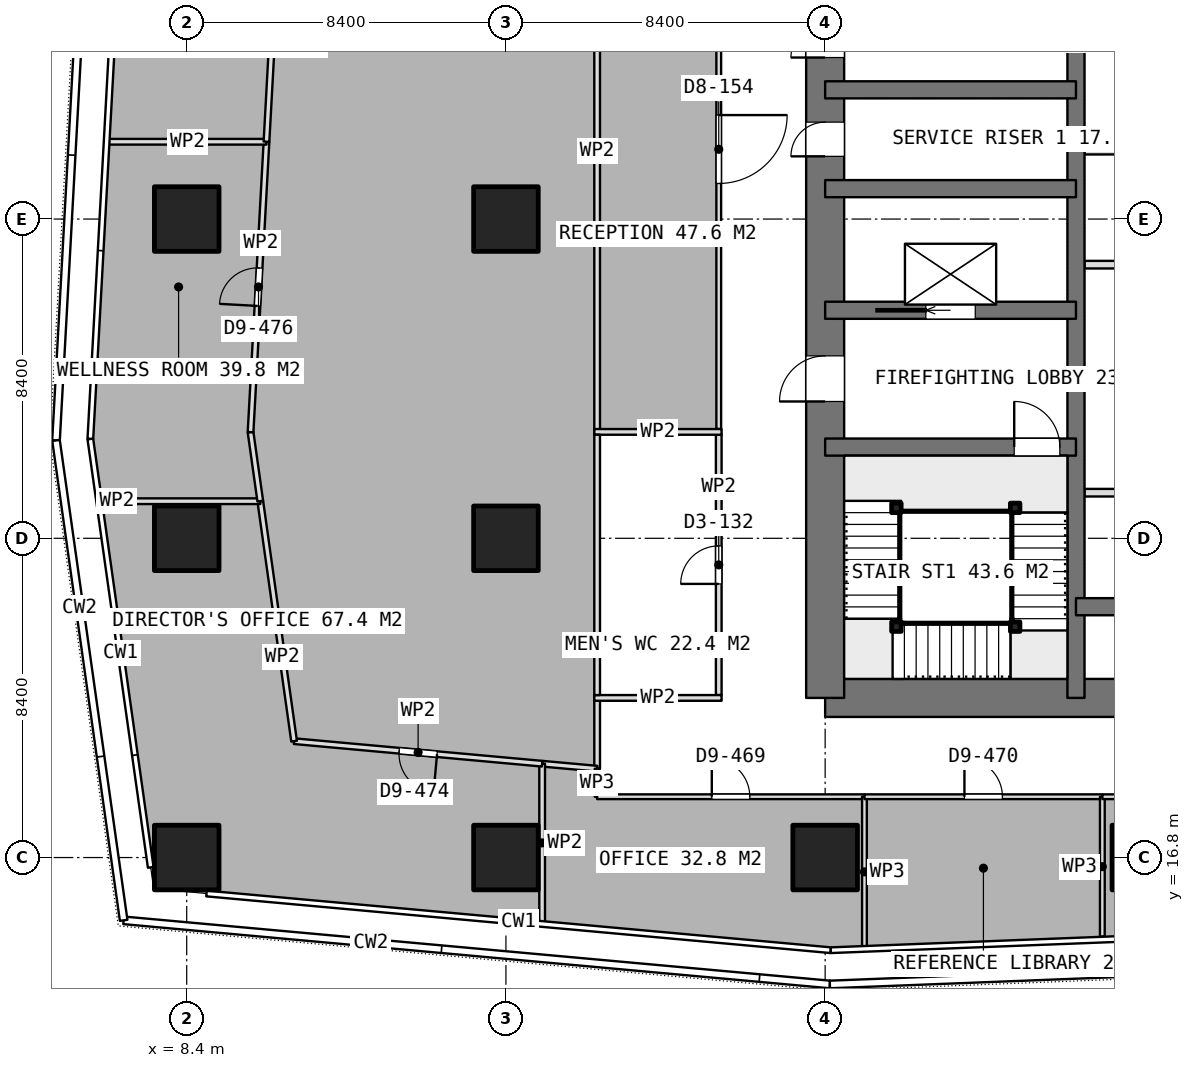
"""IFC4 building model, lengths in metres.
Left out: names, types, materials, properties, quantities, classifications, styles, units other than length and angle.
Written with IfcOpenShell. Run it as: python <this file> out.ifc"""

import sys

from ifc_helpers import new_model, si_unit, direction, frame, frame_2d, origin, origin_2d, place, context, subcontext, project, spatial, rectangle, extrude, element, fill, save


model = new_model("IFC4")
c1 = context("Model", 3, precision=1e-05, world=origin(), true_north=direction((0.0, 1.0)))
c2 = subcontext(c1, "Body", "Model", "MODEL_VIEW")
j1 = project(units=[si_unit("LENGTHUNIT", "METRE"), si_unit("PLANEANGLEUNIT", "RADIAN")], contexts=[c1])
p1 = place(None, origin())
s1 = spatial("IfcSite", under=j1, at=p1, CompositionType="ELEMENT")
p2 = place(p1, origin())
s2 = spatial("IfcBuilding", under=s1, at=p2, CompositionType="ELEMENT")
p3 = place(p2, frame((0.0, 0.0, 125.3)))
s3 = spatial("IfcBuildingStorey", under=s2, at=p3, CompositionType="ELEMENT", Elevation=125.3)
p4 = place(p3, frame((25.2, 21.0, 0.0), z_axis=(0.0, 0.0, 1.0), x_axis=(1.0, 0.0, 0.0)))
e1 = element("IfcWall", 1, at=p4, inside=s3, PredefinedType="SHEAR", context=c2, shape_type="SweptSolid", body=[
    extrude(rectangle(XDim=10.4, YDim=1.0, at=frame_2d((5.2, 0.0))), origin(), (0.0, 0.0, 1.0), 3.75),
])
p5 = place(p3, frame((25.2, 21.0, 0.0), z_axis=(0.0, 0.0, 1.0), x_axis=(0.0, 1.0, 0.0)))
e2 = element("IfcWall", 2, at=p5, inside=s3, PredefinedType="SHEAR", context=c2, shape_type="SweptSolid", body=[
    extrude(rectangle(XDim=25.2, YDim=1.0, at=frame_2d((12.6, 0.0))), origin(), (0.0, 0.0, 1.0), 3.75),
])
p6 = place(p5, frame((7.8, 0.0, 0.0)))
e3 = element("IfcOpeningElement", 3, at=p6, cuts=e2, PredefinedType="OPENING", context=c2, shape_type="SweptSolid", body=[
    extrude(rectangle(XDim=1.2, YDim=2.1, at=frame_2d((0.6, 1.05))), frame((0.0, 0.51, 0.0), z_axis=(0.0, -1.0, 0.0), x_axis=(1.0, 0.0, 0.0)), (0.0, 0.0, 1.0), 1.02),
])
p7 = place(p5, frame((14.25, 0.0, 0.0)))
e4 = element("IfcOpeningElement", 4, at=p7, cuts=e2, PredefinedType="OPENING", context=c2, shape_type="SweptSolid", body=[
    extrude(rectangle(XDim=0.9, YDim=2.1, at=frame_2d((0.45, 1.05))), frame((0.0, 0.51, 0.0), z_axis=(0.0, -1.0, 0.0), x_axis=(1.0, 0.0, 0.0)), (0.0, 0.0, 1.0), 1.02),
])
p8 = place(p5, frame((16.85, 0.0, 0.0)))
e5 = element("IfcOpeningElement", 5, at=p8, cuts=e2, PredefinedType="OPENING", context=c2, shape_type="SweptSolid", body=[
    extrude(rectangle(XDim=0.9, YDim=2.1, at=frame_2d((0.45, 1.05))), frame((0.0, 0.51, 0.0), z_axis=(0.0, -1.0, 0.0), x_axis=(1.0, 0.0, 0.0)), (0.0, 0.0, 1.0), 1.02),
])
p9 = place(p5, frame((19.025, 0.0, 0.0)))
e6 = element("IfcOpeningElement", 6, at=p9, cuts=e2, PredefinedType="OPENING", context=c2, shape_type="SweptSolid", body=[
    extrude(rectangle(XDim=1.2, YDim=2.1, at=frame_2d((0.6, 1.05))), frame((0.0, 0.51, 0.0), z_axis=(0.0, -1.0, 0.0), x_axis=(1.0, 0.0, 0.0)), (0.0, 0.0, 1.0), 1.02),
])
p10 = place(p3, frame((31.8, 21.0, 0.0), z_axis=(0.0, 0.0, 1.0), x_axis=(0.0, 1.0, 0.0)))
e7 = element("IfcWall", 7, at=p10, inside=s3, PredefinedType="SHEAR", context=c2, shape_type="SweptSolid", body=[
    extrude(rectangle(XDim=25.2, YDim=0.45, at=frame_2d((12.6, 0.0))), origin(), (0.0, 0.0, 1.0), 3.75),
])
p11 = place(p3, frame((31.8, 23.4, 0.0), z_axis=(0.0, 0.0, 1.0), x_axis=(1.0, 0.0, 0.0)))
e8 = element("IfcWall", 8, at=p11, inside=s3, PredefinedType="SHEAR", context=c2, shape_type="SweptSolid", body=[
    extrude(rectangle(XDim=3.8, YDim=0.45, at=frame_2d((1.9, 0.0))), origin(), (0.0, 0.0, 1.0), 3.75),
])
p12 = place(p3, frame((25.2, 27.6, 0.0), z_axis=(0.0, 0.0, 1.0), x_axis=(1.0, 0.0, 0.0)))
e9 = element("IfcWall", 9, at=p12, inside=s3, PredefinedType="SHEAR", context=c2, shape_type="SweptSolid", body=[
    extrude(rectangle(XDim=6.6, YDim=0.45, at=frame_2d((3.3, 0.0))), origin(), (0.0, 0.0, 1.0), 3.75),
])
p13 = place(p12, frame((4.975, 0.0, 0.0)))
e10 = element("IfcOpeningElement", 10, at=p13, cuts=e9, PredefinedType="OPENING", context=c2, shape_type="SweptSolid", body=[
    extrude(rectangle(XDim=1.2, YDim=2.1, at=frame_2d((0.6, 1.05))), frame((0.0, 0.235, 0.0), z_axis=(0.0, -1.0, 0.0), x_axis=(1.0, 0.0, 0.0)), (0.0, 0.0, 1.0), 0.47),
])
p14 = place(p3, frame((25.2, 31.2, 0.0), z_axis=(0.0, 0.0, 1.0), x_axis=(1.0, 0.0, 0.0)))
e11 = element("IfcWall", 11, at=p14, inside=s3, PredefinedType="SHEAR", context=c2, shape_type="SweptSolid", body=[
    extrude(rectangle(XDim=6.6, YDim=0.45, at=frame_2d((3.3, 0.0))), origin(), (0.0, 0.0, 1.0), 3.75),
])
p15 = place(p14, frame((2.65, 0.0, 0.0)))
e12 = element("IfcOpeningElement", 12, at=p15, cuts=e11, PredefinedType="OPENING", context=c2, shape_type="SweptSolid", body=[
    extrude(rectangle(XDim=1.3, YDim=2.1, at=frame_2d((0.65, 1.05))), frame((0.0, 0.235, 0.0), z_axis=(0.0, -1.0, 0.0), x_axis=(1.0, 0.0, 0.0)), (0.0, 0.0, 1.0), 0.47),
])
for number, where, z_axis, x_axis in (
    (13, (25.2, 34.4, 0.0), (0.0, 0.0, 1.0), (1.0, 0.0, 0.0)),
    (14, (25.2, 37.0, 0.0), (0.0, 0.0, 1.0), (1.0, 0.0, 0.0)),
):
    element("IfcWall", number, at=place(p3, frame(where, z_axis=z_axis, x_axis=x_axis)), inside=s3, PredefinedType="SHEAR", context=c2, shape_type="SweptSolid", body=[
        extrude(rectangle(XDim=6.6, YDim=0.45, at=frame_2d((3.3, 0.0))), origin(), (0.0, 0.0, 1.0), 3.75),
    ])
for number, where, z_axis, x_axis in (
    (15, (8.4, 16.8, 0.0), (0.0, 0.0, 1.0), (1.0, 0.0, 0.0)),
    (16, (8.4, 25.2, 0.0), (0.0, 0.0, 1.0), (1.0, 0.0, 0.0)),
    (17, (8.4, 33.6, 0.0), (0.0, 0.0, 1.0), (1.0, 0.0, 0.0)),
    (18, (16.8, 16.8, 0.0), (0.0, 0.0, 1.0), (1.0, 0.0, 0.0)),
    (19, (16.8, 25.2, 0.0), (0.0, 0.0, 1.0), (1.0, 0.0, 0.0)),
    (20, (16.8, 33.6, 0.0), (0.0, 0.0, 1.0), (1.0, 0.0, 0.0)),
    (21, (25.2, 16.8, 0.0), (0.0, 0.0, 1.0), (1.0, 0.0, 0.0)),
    (22, (33.6, 16.8, 0.0), (0.0, 0.0, 1.0), (1.0, 0.0, 0.0)),
):
    element("IfcColumn", number, at=place(p3, frame(where, z_axis=z_axis, x_axis=x_axis)), inside=s3, PredefinedType="COLUMN", context=c2, shape_type="SweptSolid", body=[
        extrude(rectangle(XDim=1.7, YDim=1.7, at=origin_2d()), origin(), (0.0, 0.0, 1.0), 3.75),
    ])
for number, where, z_axis, x_axis in (
    (23, (32.025, 26.4, 0.0), (0.0, 0.0, 1.0), (1.0, 0.0, 0.0)),
    (24, (32.025, 29.4, 0.0), (0.0, 0.0, 1.0), (1.0, 0.0, 0.0)),
    (25, (32.025, 32.4, 0.0), (0.0, 0.0, 1.0), (1.0, 0.0, 0.0)),
    (26, (32.025, 35.4, 0.0), (0.0, 0.0, 1.0), (1.0, 0.0, 0.0)),
):
    element("IfcWall", number, at=place(p3, frame(where, z_axis=z_axis, x_axis=x_axis)), inside=s3, PredefinedType="PARTITIONING", context=c2, shape_type="SweptSolid", body=[
        extrude(rectangle(XDim=3.35, YDim=0.2, at=frame_2d((1.675, 0.0))), origin(), (0.0, 0.0, 1.0), 3.5),
    ])
for number, where, z_axis, x_axis in (
    (27, (19.125, 21.0, 0.0), (0.0, 0.0, 1.0), (1.0, 0.0, 0.0)),
    (28, (19.125, 28.0, 0.0), (0.0, 0.0, 1.0), (1.0, 0.0, 0.0)),
):
    element("IfcWall", number, at=place(p3, frame(where, z_axis=z_axis, x_axis=x_axis)), inside=s3, PredefinedType="PARTITIONING", context=c2, shape_type="SweptSolid", body=[
        extrude(rectangle(XDim=3.35, YDim=0.15, at=frame_2d((1.675, 0.0))), origin(), (0.0, 0.0, 1.0), 3.5),
    ])
p16 = place(p3, frame((19.2, 21.075, 0.0), z_axis=(0.0, 0.0, 1.0), x_axis=(0.0, 1.0, 0.0)))
e29 = element("IfcWall", 29, at=p16, inside=s3, PredefinedType="PARTITIONING", context=c2, shape_type="SweptSolid", body=[
    extrude(rectangle(XDim=6.85, YDim=0.15, at=frame_2d((3.425, 0.0))), origin(), (0.0, 0.0, 1.0), 3.5),
])
p17 = place(p3, frame((22.4, 21.075, 0.0), z_axis=(0.0, 0.0, 1.0), x_axis=(0.0, 1.0, 0.0)))
e30 = element("IfcWall", 30, at=p17, inside=s3, PredefinedType="PARTITIONING", context=c2, shape_type="SweptSolid", body=[
    extrude(rectangle(XDim=6.85, YDim=0.15, at=frame_2d((3.425, 0.0))), origin(), (0.0, 0.0, 1.0), 3.5),
])
p18 = place(p17, frame((2.925, 0.0, 0.0)))
e31 = element("IfcOpeningElement", 31, at=p18, cuts=e30, PredefinedType="OPENING", context=c2, shape_type="SweptSolid", body=[
    extrude(rectangle(XDim=1.0, YDim=2.1, at=frame_2d((0.5, 1.05))), frame((0.0, 0.085, 0.0), z_axis=(0.0, -1.0, 0.0), x_axis=(1.0, 0.0, 0.0)), (0.0, 0.0, 1.0), 0.17),
])
p19 = place(p3, frame((19.2, 42.873, 0.0), z_axis=(0.0, 0.0, 1.0), x_axis=(0.0, -1.0, 0.0)))
e32 = element("IfcWall", 32, at=p19, inside=s3, PredefinedType="PARTITIONING", context=c2, shape_type="SweptSolid", body=[
    extrude(rectangle(XDim=14.948, YDim=0.15, at=frame_2d((7.474, 0.0))), origin(), (0.0, 0.0, 1.0), 3.5),
])
p20 = place(p3, frame((19.2, 21.075, 0.0), z_axis=(0.0, 0.0, 1.0), x_axis=(0.0, -1.0, 0.0)))
e33 = element("IfcWall", 33, at=p20, inside=s3, PredefinedType="PARTITIONING", context=c2, shape_type="SweptSolid", body=[
    extrude(rectangle(XDim=1.937, YDim=0.15, at=frame_2d((0.969, 0.0))), origin(), (0.0, 0.0, 1.0), 3.5),
])
p21 = place(p3, frame((19.2, 19.138, 0.0), z_axis=(0.0, 0.0, 1.0), x_axis=(-0.995920706464, 0.090232734836, 0.0)))
e34 = element("IfcWall", 34, at=p21, inside=s3, PredefinedType="PARTITIONING", context=c2, shape_type="SweptSolid", body=[
    extrude(rectangle(XDim=1.453, YDim=0.15, at=frame_2d((0.727, 0.0))), origin(), (0.0, 0.0, 1.0), 3.5),
])
p22 = place(p3, frame((17.753, 19.269, 0.0), z_axis=(0.0, 0.0, 1.0), x_axis=(0.0, -1.0, 0.0)))
e35 = element("IfcWall", 35, at=p22, inside=s3, PredefinedType="PARTITIONING", context=c2, shape_type="SweptSolid", body=[
    extrude(rectangle(XDim=4.167, YDim=0.15, at=frame_2d((2.083, 0.0))), origin(), (0.0, 0.0, 1.0), 3.5),
])
p23 = place(p3, frame((17.752, 19.269, 0.0), z_axis=(0.0, 0.0, 1.0), x_axis=(-0.995896565077, 0.090498793736, 0.0)))
e36 = element("IfcWall", 36, at=p23, inside=s3, PredefinedType="PARTITIONING", context=c2, shape_type="SweptSolid", body=[
    extrude(rectangle(XDim=6.553, YDim=0.15, at=frame_2d((3.276, 0.0))), origin(), (0.0, 0.0, 1.0), 3.5),
])
p24 = place(p23, frame((2.776, 0.0, 0.0)))
e37 = element("IfcOpeningElement", 37, at=p24, cuts=e36, PredefinedType="OPENING", context=c2, shape_type="SweptSolid", body=[
    extrude(rectangle(XDim=1.0, YDim=2.1, at=frame_2d((0.5, 1.05))), frame((0.0, 0.085, 0.0), z_axis=(0.0, -1.0, 0.0), x_axis=(1.0, 0.0, 0.0)), (0.0, 0.0, 1.0), 0.17),
])
p25 = place(p3, frame((11.226, 19.862, 0.0), z_axis=(0.0, 0.0, 1.0), x_axis=(-0.13959860056, 0.990208175447, 0.0)))
e38 = element("IfcWall", 38, at=p25, inside=s3, PredefinedType="PARTITIONING", context=c2, shape_type="SweptSolid", body=[
    extrude(rectangle(XDim=6.376, YDim=0.15, at=frame_2d((3.188, 0.0))), origin(), (0.0, 0.0, 1.0), 3.5),
])
p26 = place(p3, frame((10.336, 26.176, 0.0), z_axis=(0.0, 0.0, 1.0), x_axis=(-1.0, 0.0, 0.0)))
e39 = element("IfcWall", 39, at=p26, inside=s3, PredefinedType="PARTITIONING", context=c2, shape_type="SweptSolid", body=[
    extrude(rectangle(XDim=4.191, YDim=0.15, at=frame_2d((2.095, 0.0))), origin(), (0.0, 0.0, 1.0), 3.5),
])
p27 = place(p3, frame((10.336, 26.177, 0.0), z_axis=(0.0, 0.0, 1.0), x_axis=(-0.139520002301, 0.990219252973, 0.0)))
e40 = element("IfcWall", 40, at=p27, inside=s3, PredefinedType="PARTITIONING", context=c2, shape_type="SweptSolid", body=[
    extrude(rectangle(XDim=1.834, YDim=0.15, at=frame_2d((0.917, 0.0))), origin(), (0.0, 0.0, 1.0), 3.5),
])
p28 = place(p3, frame((10.08, 27.993, 0.0), z_axis=(0.0, 0.0, 1.0), x_axis=(0.054745561338, 0.998500337263, 0.0)))
e41 = element("IfcWall", 41, at=p28, inside=s3, PredefinedType="PARTITIONING", context=c2, shape_type="SweptSolid", body=[
    extrude(rectangle(XDim=7.653, YDim=0.15, at=frame_2d((3.826, 0.0))), origin(), (0.0, 0.0, 1.0), 3.5),
])
p29 = place(p28, frame((3.326, 0.0, 0.0)))
e42 = element("IfcOpeningElement", 42, at=p29, cuts=e41, PredefinedType="OPENING", context=c2, shape_type="SweptSolid", body=[
    extrude(rectangle(XDim=1.0, YDim=2.1, at=frame_2d((0.5, 1.05))), frame((0.0, 0.085, 0.0), z_axis=(0.0, -1.0, 0.0), x_axis=(1.0, 0.0, 0.0)), (0.0, 0.0, 1.0), 0.17),
])
p30 = place(p3, frame((10.499, 35.634, 0.0), z_axis=(0.0, 0.0, 1.0), x_axis=(-1.0, 0.0, 0.0)))
e43 = element("IfcWall", 43, at=p30, inside=s3, PredefinedType="PARTITIONING", context=c2, shape_type="SweptSolid", body=[
    extrude(rectangle(XDim=4.156, YDim=0.15, at=frame_2d((2.078, 0.0))), origin(), (0.0, 0.0, 1.0), 3.5),
])
p31 = place(p3, frame((10.499, 35.635, 0.0), z_axis=(0.0, 0.0, 1.0), x_axis=(0.054773615864, 0.9984987987, 0.0)))
e44 = element("IfcWall", 44, at=p31, inside=s3, PredefinedType="PARTITIONING", context=c2, shape_type="SweptSolid", body=[
    extrude(rectangle(XDim=7.359, YDim=0.15, at=frame_2d((3.679, 0.0))), origin(), (0.0, 0.0, 1.0), 3.5),
])
p32 = place(p31, frame((3.124, 0.0, 0.0)))
e45 = element("IfcOpeningElement", 45, at=p32, cuts=e44, PredefinedType="OPENING", context=c2, shape_type="SweptSolid", body=[
    extrude(rectangle(XDim=1.0, YDim=2.1, at=frame_2d((0.5, 1.05))), frame((0.0, 0.085, 0.0), z_axis=(0.0, -1.0, 0.0), x_axis=(1.0, 0.0, 0.0)), (0.0, 0.0, 1.0), 0.17),
])
p33 = place(p3, frame((19.2, 19.138, 0.0), z_axis=(0.0, 0.0, 1.0), x_axis=(0.0, -1.0, 0.0)))
e46 = element("IfcWall", 46, at=p33, inside=s3, PredefinedType="PARTITIONING", context=c2, shape_type="SweptSolid", body=[
    extrude(rectangle(XDim=0.738, YDim=0.125, at=frame_2d((0.369, 0.0))), origin(), (0.0, 0.0, 1.0), 3.5),
])
p34 = place(p3, frame((19.2, 18.4, 0.0), z_axis=(0.0, 0.0, 1.0), x_axis=(1.0, 0.0, 0.0)))
e47 = element("IfcWall", 47, at=p34, inside=s3, PredefinedType="PARTITIONING", context=c2, shape_type="SweptSolid", body=[
    extrude(rectangle(XDim=7.034, YDim=0.125, at=frame_2d((3.517, 0.0))), origin(), (0.0, 0.0, 1.0), 3.5),
])
p35 = place(p34, frame((3.017, 0.0, 0.0)))
e48 = element("IfcOpeningElement", 48, at=p35, cuts=e47, PredefinedType="OPENING", context=c2, shape_type="SweptSolid", body=[
    extrude(rectangle(XDim=1.0, YDim=2.1, at=frame_2d((0.5, 1.05))), frame((0.0, 0.073, 0.0), z_axis=(0.0, -1.0, 0.0), x_axis=(1.0, 0.0, 0.0)), (0.0, 0.0, 1.0), 0.145),
])
p36 = place(p3, frame((26.234, 18.4, 0.0), z_axis=(0.0, 0.0, 1.0), x_axis=(0.0, -1.0, 0.0)))
e49 = element("IfcWall", 49, at=p36, inside=s3, PredefinedType="PARTITIONING", context=c2, shape_type="SweptSolid", body=[
    extrude(rectangle(XDim=3.954, YDim=0.125, at=frame_2d((1.977, 0.0))), origin(), (0.0, 0.0, 1.0), 3.5),
])
p37 = place(p3, frame((26.235, 18.4, 0.0), z_axis=(0.0, 0.0, 1.0), x_axis=(1.0, 0.0, 0.0)))
e50 = element("IfcWall", 50, at=p37, inside=s3, PredefinedType="PARTITIONING", context=c2, shape_type="SweptSolid", body=[
    extrude(rectangle(XDim=6.259, YDim=0.125, at=frame_2d((3.129, 0.0))), origin(), (0.0, 0.0, 1.0), 3.5),
])
p38 = place(p37, frame((2.63, 0.0, 0.0)))
e51 = element("IfcOpeningElement", 51, at=p38, cuts=e50, PredefinedType="OPENING", context=c2, shape_type="SweptSolid", body=[
    extrude(rectangle(XDim=1.0, YDim=2.1, at=frame_2d((0.5, 1.05))), frame((0.0, 0.073, 0.0), z_axis=(0.0, -1.0, 0.0), x_axis=(1.0, 0.0, 0.0)), (0.0, 0.0, 1.0), 0.145),
])
p39 = place(p3, frame((32.494, 18.4, 0.0), z_axis=(0.0, 0.0, 1.0), x_axis=(0.0, -1.0, 0.0)))
e52 = element("IfcWall", 52, at=p39, inside=s3, PredefinedType="PARTITIONING", context=c2, shape_type="SweptSolid", body=[
    extrude(rectangle(XDim=3.68, YDim=0.125, at=frame_2d((1.84, 0.0))), origin(), (0.0, 0.0, 1.0), 3.5),
])
p40 = place(p3, frame((32.495, 18.4, 0.0), z_axis=(0.0, 0.0, 1.0), x_axis=(1.0, 0.0, 0.0)))
e53 = element("IfcWall", 53, at=p40, inside=s3, PredefinedType="PARTITIONING", context=c2, shape_type="SweptSolid", body=[
    extrude(rectangle(XDim=8.506, YDim=0.125, at=frame_2d((4.253, 0.0))), origin(), (0.0, 0.0, 1.0), 3.5),
])
p41 = place(p40, frame((3.753, 0.0, 0.0)))
e54 = element("IfcOpeningElement", 54, at=p41, cuts=e53, PredefinedType="OPENING", context=c2, shape_type="SweptSolid", body=[
    extrude(rectangle(XDim=1.0, YDim=2.1, at=frame_2d((0.5, 1.05))), frame((0.0, 0.073, 0.0), z_axis=(0.0, -1.0, 0.0), x_axis=(1.0, 0.0, 0.0)), (0.0, 0.0, 1.0), 0.145),
])
p42 = place(p3, frame((22.4, 42.872, 0.0), z_axis=(0.0, 0.0, 1.0), x_axis=(0.0, -1.0, 0.0)))
e55 = element("IfcWall", 55, at=p42, inside=s3, PredefinedType="PARTITIONING", context=c2, shape_type="SweptSolid", body=[
    extrude(rectangle(XDim=14.797, YDim=0.125, at=frame_2d((7.398, 0.0))), origin(), (0.0, 0.0, 1.0), 3.5),
])
p43 = place(p42, frame((6.536, 0.0, 0.0)))
e56 = element("IfcOpeningElement", 56, at=p43, cuts=e55, PredefinedType="OPENING", context=c2, shape_type="SweptSolid", body=[
    extrude(rectangle(XDim=1.8, YDim=2.1, at=frame_2d((0.9, 1.05))), frame((0.0, 0.073, 0.0), z_axis=(0.0, -1.0, 0.0), x_axis=(1.0, 0.0, 0.0)), (0.0, 0.0, 1.0), 0.145),
])
for number, where, z_axis, x_axis in (
    (57, (30.2, 26.0, 0.0), (0.0, 0.0, 1.0), (1.0, 0.0, 0.0)),
    (58, (30.2, 22.875, 0.0), (0.0, 0.0, 1.0), (1.0, 0.0, 0.0)),
    (59, (27.075, 22.875, 0.0), (0.0, 0.0, 1.0), (1.0, 0.0, 0.0)),
    (60, (27.075, 26.0, 0.0), (0.0, 0.0, 1.0), (1.0, 0.0, 0.0)),
):
    element("IfcColumn", number, at=place(p3, frame(where, z_axis=z_axis, x_axis=x_axis)), inside=s3, PredefinedType="COLUMN", context=c2, shape_type="SweptSolid", body=[
        extrude(rectangle(XDim=0.25, YDim=0.25, at=origin_2d()), origin(), (0.0, 0.0, 1.0), 3.75),
    ])
p44 = place(p6, origin())
e61 = element("IfcDoor", 61, at=p44, inside=s3, OperationType="SINGLE_SWING_LEFT", PredefinedType="DOOR", context=c2, shape_type="SweptSolid", body=[
    extrude(rectangle(XDim=1.2, YDim=2.1, at=frame_2d((0.6, 1.05))), frame((0.0, 0.025, 0.0), z_axis=(0.0, -1.0, 0.0), x_axis=(1.0, 0.0, 0.0)), (0.0, 0.0, 1.0), 0.05),
])
fill(e3, e61)
p45 = place(p7, origin())
e62 = element("IfcDoor", 62, at=p45, inside=s3, OperationType="SINGLE_SWING_LEFT", PredefinedType="DOOR", context=c2, shape_type="SweptSolid", body=[
    extrude(rectangle(XDim=0.9, YDim=2.1, at=frame_2d((0.45, 1.05))), frame((0.0, 0.025, 0.0), z_axis=(0.0, -1.0, 0.0), x_axis=(1.0, 0.0, 0.0)), (0.0, 0.0, 1.0), 0.05),
])
fill(e4, e62)
p46 = place(p8, origin())
e63 = element("IfcDoor", 63, at=p46, inside=s3, OperationType="SINGLE_SWING_LEFT", PredefinedType="DOOR", context=c2, shape_type="SweptSolid", body=[
    extrude(rectangle(XDim=0.9, YDim=2.1, at=frame_2d((0.45, 1.05))), frame((0.0, 0.025, 0.0), z_axis=(0.0, -1.0, 0.0), x_axis=(1.0, 0.0, 0.0)), (0.0, 0.0, 1.0), 0.05),
])
fill(e5, e63)
p47 = place(p15, origin())
e64 = element("IfcDoor", 64, at=p47, inside=s3, OperationType="SLIDING_TO_LEFT", PredefinedType="USERDEFINED", context=c2, shape_type="SweptSolid", body=[
    extrude(rectangle(XDim=1.3, YDim=2.1, at=frame_2d((0.65, 1.05))), frame((0.0, 0.025, 0.0), z_axis=(0.0, -1.0, 0.0), x_axis=(1.0, 0.0, 0.0)), (0.0, 0.0, 1.0), 0.05),
])
fill(e12, e64)
p48 = place(p18, origin())
e65 = element("IfcDoor", 65, at=p48, inside=s3, OperationType="SINGLE_SWING_LEFT", PredefinedType="DOOR", context=c2, shape_type="SweptSolid", body=[
    extrude(rectangle(XDim=1.0, YDim=2.1, at=frame_2d((0.5, 1.05))), frame((0.0, 0.025, 0.0), z_axis=(0.0, -1.0, 0.0), x_axis=(1.0, 0.0, 0.0)), (0.0, 0.0, 1.0), 0.05),
])
fill(e31, e65)
p49 = place(p29, origin())
e66 = element("IfcDoor", 66, at=p49, inside=s3, OperationType="SINGLE_SWING_LEFT", PredefinedType="DOOR", context=c2, shape_type="SweptSolid", body=[
    extrude(rectangle(XDim=1.0, YDim=2.1, at=frame_2d((0.5, 1.05))), frame((0.0, 0.025, 0.0), z_axis=(0.0, -1.0, 0.0), x_axis=(1.0, 0.0, 0.0)), (0.0, 0.0, 1.0), 0.05),
])
fill(e42, e66)
p50 = place(p24, origin())
e67 = element("IfcDoor", 67, at=p50, inside=s3, OperationType="SINGLE_SWING_LEFT", PredefinedType="DOOR", context=c2, shape_type="SweptSolid", body=[
    extrude(rectangle(XDim=1.0, YDim=2.1, at=frame_2d((0.5, 1.05))), frame((0.0, 0.025, 0.0), z_axis=(0.0, -1.0, 0.0), x_axis=(1.0, 0.0, 0.0)), (0.0, 0.0, 1.0), 0.05),
])
fill(e37, e67)
p51 = place(p35, origin())
e68 = element("IfcDoor", 68, at=p51, inside=s3, OperationType="SINGLE_SWING_LEFT", PredefinedType="DOOR", context=c2, shape_type="SweptSolid", body=[
    extrude(rectangle(XDim=1.0, YDim=2.1, at=frame_2d((0.5, 1.05))), frame((0.0, 0.025, 0.0), z_axis=(0.0, -1.0, 0.0), x_axis=(1.0, 0.0, 0.0)), (0.0, 0.0, 1.0), 0.05),
])
fill(e48, e68)
p52 = place(p38, origin())
e69 = element("IfcDoor", 69, at=p52, inside=s3, OperationType="SINGLE_SWING_LEFT", PredefinedType="DOOR", context=c2, shape_type="SweptSolid", body=[
    extrude(rectangle(XDim=1.0, YDim=2.1, at=frame_2d((0.5, 1.05))), frame((0.0, 0.025, 0.0), z_axis=(0.0, -1.0, 0.0), x_axis=(1.0, 0.0, 0.0)), (0.0, 0.0, 1.0), 0.05),
])
fill(e51, e69)
p53 = place(p43, origin())
e70 = element("IfcDoor", 70, at=p53, inside=s3, OperationType="DOUBLE_DOOR_SINGLE_SWING", PredefinedType="DOOR", context=c2, shape_type="SweptSolid", body=[
    extrude(rectangle(XDim=1.8, YDim=2.1, at=frame_2d((0.9, 1.05))), frame((0.0, 0.025, 0.0), z_axis=(0.0, -1.0, 0.0), x_axis=(1.0, 0.0, 0.0)), (0.0, 0.0, 1.0), 0.05),
])
fill(e56, e70)
p54 = place(p13, origin())
e71 = element("IfcDoor", 71, at=p54, inside=s3, OperationType="SINGLE_SWING_RIGHT", PredefinedType="DOOR", context=c2, shape_type="SweptSolid", body=[
    extrude(rectangle(XDim=1.2, YDim=2.1, at=frame_2d((0.6, 1.05))), frame((0.0, 0.025, 0.0), z_axis=(0.0, -1.0, 0.0), x_axis=(1.0, 0.0, 0.0)), (0.0, 0.0, 1.0), 0.05),
])
fill(e10, e71)
save(model, sys.argv[1])
